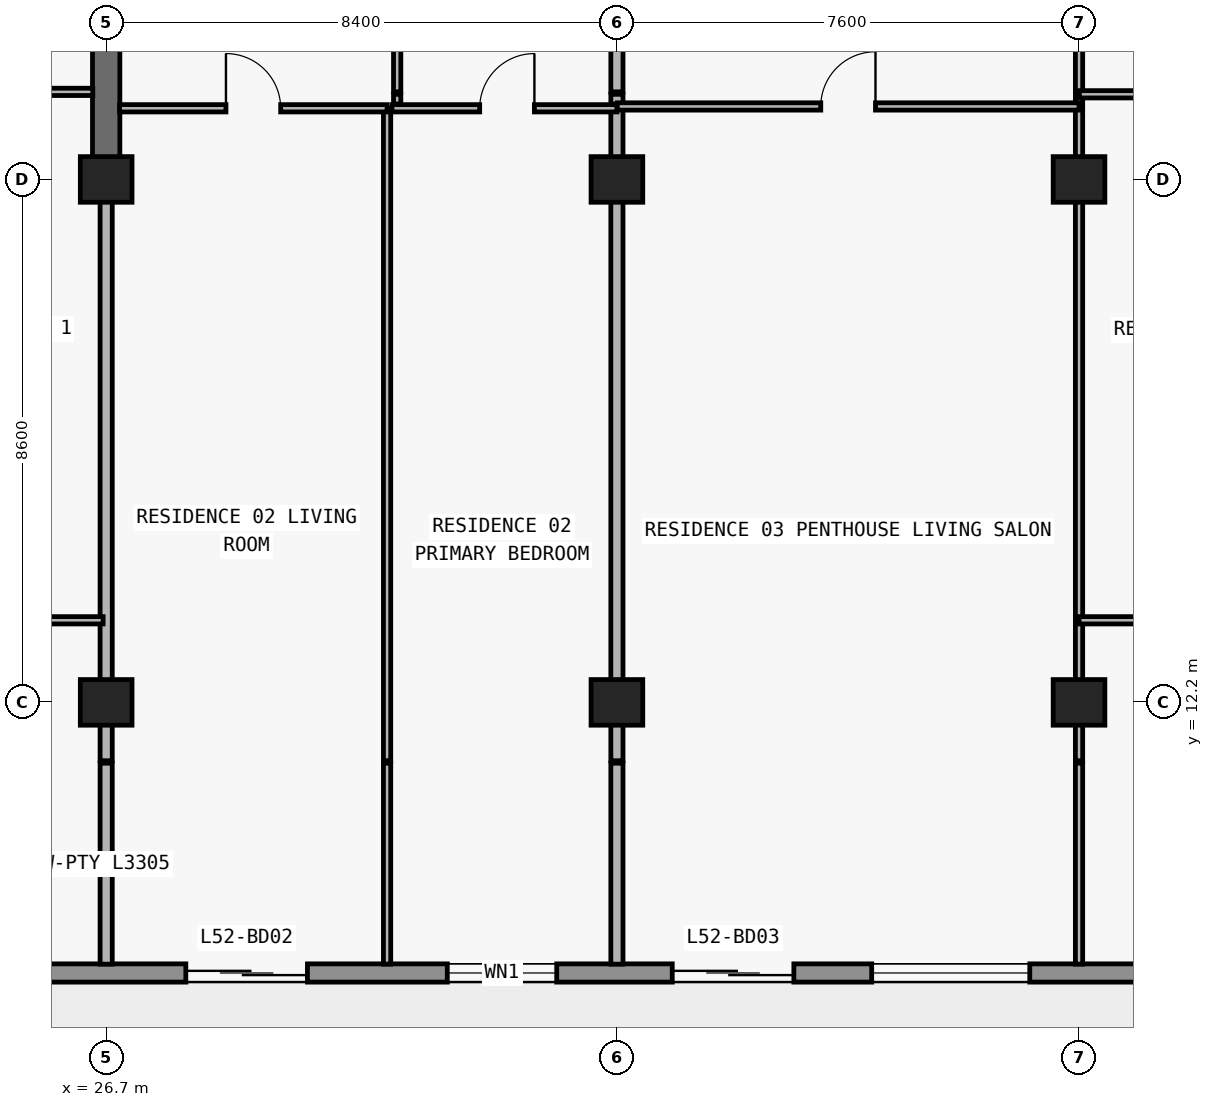
"""IFC4 building model, lengths in metres.
Left out: names, types, materials, properties, quantities, classifications, styles, units other than length and angle.
Written with IfcOpenShell. Run it as: python <this file> out.ifc"""

import sys

from ifc_helpers import new_model, si_unit, direction, frame, frame_2d, origin, origin_2d, place, context, subcontext, project, spatial, rectangle, extrude, element, fill, save


model = new_model("IFC4")
c1 = context("Model", 3, precision=1e-05, world=origin(), true_north=direction((0.0, 1.0)))
c2 = subcontext(c1, "Body", "Model", "MODEL_VIEW")
j1 = project(units=[si_unit("LENGTHUNIT", "METRE"), si_unit("PLANEANGLEUNIT", "RADIAN")], contexts=[c1])
p1 = place(None, origin())
s1 = spatial("IfcSite", under=j1, at=p1, CompositionType="ELEMENT")
p2 = place(p1, origin())
s2 = spatial("IfcBuilding", under=s1, at=p2, CompositionType="ELEMENT")
p3 = place(p2, frame((0.0, 0.0, 188.4)))
s3 = spatial("IfcBuildingStorey", under=s2, at=p3, CompositionType="ELEMENT", Elevation=188.4)
for number, where, z_axis, x_axis in (
    (1, (26.7, 12.2, 0.0), (0.0, 0.0, 1.0), (1.0, 0.0, 0.0)),
    (2, (35.1, 12.2, 0.0), (0.0, 0.0, 1.0), (1.0, 0.0, 0.0)),
    (3, (42.7, 12.2, 0.0), (0.0, 0.0, 1.0), (1.0, 0.0, 0.0)),
    (4, (26.7, 20.8, 0.0), (0.0, 0.0, 1.0), (1.0, 0.0, 0.0)),
    (5, (35.1, 20.8, 0.0), (0.0, 0.0, 1.0), (1.0, 0.0, 0.0)),
    (6, (42.7, 20.8, 0.0), (0.0, 0.0, 1.0), (1.0, 0.0, 0.0)),
):
    element("IfcColumn", number, at=place(p3, frame(where, z_axis=z_axis, x_axis=x_axis)), inside=s3, PredefinedType="COLUMN", context=c2, shape_type="SweptSolid", body=[
        extrude(rectangle(XDim=0.85, YDim=0.75, at=origin_2d()), origin(), (0.0, 0.0, 1.0), 3.05),
    ])
p4 = place(p3, frame((26.7, 20.8, 0.0), z_axis=(0.0, 0.0, 1.0), x_axis=(0.0, 1.0, 0.0)))
e7 = element("IfcWall", 7, at=p4, inside=s3, PredefinedType="SHEAR", context=c2, shape_type="SweptSolid", body=[
    extrude(rectangle(XDim=8.6, YDim=0.45, at=frame_2d((4.3, 0.0))), origin(), (0.0, 0.0, 1.0), 3.05),
])
p5 = place(p3, frame((67.7, 7.75, 0.0), z_axis=(0.0, 0.0, 1.0), x_axis=(-1.0, 0.0, 0.0)))
e8 = element("IfcWall", 8, at=p5, inside=s3, PredefinedType="STANDARD", context=c2, shape_type="SweptSolid", body=[
    extrude(rectangle(XDim=57.6, YDim=0.3, at=frame_2d((28.8, 0.0))), origin(), (0.0, 0.0, 1.0), 3.05),
])
p6 = place(p5, frame((54.69, 0.0, 0.0)))
e9 = element("IfcOpeningElement", 9, at=p6, cuts=e8, PredefinedType="OPENING", context=c2, shape_type="SweptSolid", body=[
    extrude(rectangle(XDim=2.0, YDim=2.3, at=frame_2d((1.0, 1.15))), frame((0.0, 0.16, 0.0), z_axis=(0.0, -1.0, 0.0), x_axis=(1.0, 0.0, 0.0)), (0.0, 0.0, 1.0), 0.32),
])
p7 = place(p5, frame((50.21, 0.0, 0.65)))
e10 = element("IfcOpeningElement", 10, at=p7, cuts=e8, PredefinedType="OPENING", context=c2, shape_type="SweptSolid", body=[
    extrude(rectangle(XDim=2.6, YDim=1.85, at=frame_2d((1.3, 0.925))), frame((0.0, 0.16, 0.0), z_axis=(0.0, -1.0, 0.0), x_axis=(1.0, 0.0, 0.0)), (0.0, 0.0, 1.0), 0.32),
])
p8 = place(p5, frame((44.1, 0.0, 0.85)))
e11 = element("IfcOpeningElement", 11, at=p8, cuts=e8, PredefinedType="OPENING", context=c2, shape_type="SweptSolid", body=[
    extrude(rectangle(XDim=2.2, YDim=1.55, at=frame_2d((1.1, 0.775))), frame((0.0, 0.16, 0.0), z_axis=(0.0, -1.0, 0.0), x_axis=(1.0, 0.0, 0.0)), (0.0, 0.0, 1.0), 0.32),
])
p9 = place(p5, frame((37.69, 0.0, 0.0)))
e12 = element("IfcOpeningElement", 12, at=p9, cuts=e8, PredefinedType="OPENING", context=c2, shape_type="SweptSolid", body=[
    extrude(rectangle(XDim=2.0, YDim=2.3, at=frame_2d((1.0, 1.15))), frame((0.0, 0.16, 0.0), z_axis=(0.0, -1.0, 0.0), x_axis=(1.0, 0.0, 0.0)), (0.0, 0.0, 1.0), 0.32),
])
p10 = place(p5, frame((33.59, 0.0, 0.85)))
e13 = element("IfcOpeningElement", 13, at=p10, cuts=e8, PredefinedType="OPENING", context=c2, shape_type="SweptSolid", body=[
    extrude(rectangle(XDim=1.8, YDim=1.55, at=frame_2d((0.9, 0.775))), frame((0.0, 0.16, 0.0), z_axis=(0.0, -1.0, 0.0), x_axis=(1.0, 0.0, 0.0)), (0.0, 0.0, 1.0), 0.32),
])
p11 = place(p5, frame((29.69, 0.0, 0.0)))
e14 = element("IfcOpeningElement", 14, at=p11, cuts=e8, PredefinedType="OPENING", context=c2, shape_type="SweptSolid", body=[
    extrude(rectangle(XDim=2.0, YDim=2.3, at=frame_2d((1.0, 1.15))), frame((0.0, 0.16, 0.0), z_axis=(0.0, -1.0, 0.0), x_axis=(1.0, 0.0, 0.0)), (0.0, 0.0, 1.0), 0.32),
])
p12 = place(p5, frame((25.81, 0.0, 0.65)))
e15 = element("IfcOpeningElement", 15, at=p12, cuts=e8, PredefinedType="OPENING", context=c2, shape_type="SweptSolid", body=[
    extrude(rectangle(XDim=2.6, YDim=1.85, at=frame_2d((1.3, 0.925))), frame((0.0, 0.16, 0.0), z_axis=(0.0, -1.0, 0.0), x_axis=(1.0, 0.0, 0.0)), (0.0, 0.0, 1.0), 0.32),
])
p13 = place(p5, frame((19.7, 0.0, 0.85)))
e16 = element("IfcOpeningElement", 16, at=p13, cuts=e8, PredefinedType="OPENING", context=c2, shape_type="SweptSolid", body=[
    extrude(rectangle(XDim=2.2, YDim=1.55, at=frame_2d((1.1, 0.775))), frame((0.0, 0.16, 0.0), z_axis=(0.0, -1.0, 0.0), x_axis=(1.0, 0.0, 0.0)), (0.0, 0.0, 1.0), 0.32),
])
p14 = place(p5, frame((13.29, 0.0, 0.0)))
e17 = element("IfcOpeningElement", 17, at=p14, cuts=e8, PredefinedType="OPENING", context=c2, shape_type="SweptSolid", body=[
    extrude(rectangle(XDim=2.0, YDim=2.3, at=frame_2d((1.0, 1.15))), frame((0.0, 0.16, 0.0), z_axis=(0.0, -1.0, 0.0), x_axis=(1.0, 0.0, 0.0)), (0.0, 0.0, 1.0), 0.32),
])
p15 = place(p5, frame((9.19, 0.0, 0.85)))
e18 = element("IfcOpeningElement", 18, at=p15, cuts=e8, PredefinedType="OPENING", context=c2, shape_type="SweptSolid", body=[
    extrude(rectangle(XDim=1.8, YDim=1.55, at=frame_2d((0.9, 0.775))), frame((0.0, 0.16, 0.0), z_axis=(0.0, -1.0, 0.0), x_axis=(1.0, 0.0, 0.0)), (0.0, 0.0, 1.0), 0.32),
])
p16 = place(p5, frame((5.273, 0.0, 0.0)))
e19 = element("IfcOpeningElement", 19, at=p16, cuts=e8, PredefinedType="OPENING", context=c2, shape_type="SweptSolid", body=[
    extrude(rectangle(XDim=2.0, YDim=2.3, at=frame_2d((1.0, 1.15))), frame((0.0, 0.16, 0.0), z_axis=(0.0, -1.0, 0.0), x_axis=(1.0, 0.0, 0.0)), (0.0, 0.0, 1.0), 0.32),
])
p17 = place(p5, frame((1.073, 0.0, 0.85)))
e20 = element("IfcOpeningElement", 20, at=p17, cuts=e8, PredefinedType="OPENING", context=c2, shape_type="SweptSolid", body=[
    extrude(rectangle(XDim=2.2, YDim=1.55, at=frame_2d((1.1, 0.775))), frame((0.0, 0.16, 0.0), z_axis=(0.0, -1.0, 0.0), x_axis=(1.0, 0.0, 0.0)), (0.0, 0.0, 1.0), 0.32),
])
p18 = place(p3, frame((26.7, 7.895, 0.0), z_axis=(0.0, 0.0, 1.0), x_axis=(0.0, 1.0, 0.0)))
e21 = element("IfcWall", 21, at=p18, inside=s3, PredefinedType="PARTITIONING", context=c2, shape_type="SweptSolid", body=[
    extrude(rectangle(XDim=3.305, YDim=0.2, at=frame_2d((1.652, 0.0))), origin(), (0.0, 0.0, 1.0), 3.05),
])
p19 = place(p3, frame((26.7, 11.24, 0.0), z_axis=(0.0, 0.0, 1.0), x_axis=(0.0, 1.0, 0.0)))
e22 = element("IfcWall", 22, at=p19, inside=s3, PredefinedType="PARTITIONING", context=c2, shape_type="SweptSolid", body=[
    extrude(rectangle(XDim=9.555, YDim=0.2, at=frame_2d((4.777, 0.0))), origin(), (0.0, 0.0, 1.0), 2.263),
])
p20 = place(p3, frame((31.32, 7.895, 0.0), z_axis=(0.0, 0.0, 1.0), x_axis=(0.0, 1.0, 0.0)))
e23 = element("IfcWall", 23, at=p20, inside=s3, PredefinedType="PARTITIONING", context=c2, shape_type="SweptSolid", body=[
    extrude(rectangle(XDim=3.305, YDim=0.12, at=frame_2d((1.652, 0.0))), origin(), (0.0, 0.0, 1.0), 3.05),
])
p21 = place(p3, frame((31.32, 11.24, 0.0), z_axis=(0.0, 0.0, 1.0), x_axis=(0.0, 1.0, 0.0)))
e24 = element("IfcWall", 24, at=p21, inside=s3, PredefinedType="PARTITIONING", context=c2, shape_type="SweptSolid", body=[
    extrude(rectangle(XDim=10.73, YDim=0.12, at=frame_2d((5.365, 0.0))), origin(), (0.0, 0.0, 1.0), 3.05),
])
p22 = place(p3, frame((31.486, 22.04, 0.0), z_axis=(0.0, 0.0, 1.0), x_axis=(0.0, 1.0, 0.0)))
e25 = element("IfcWall", 25, at=p22, inside=s3, PredefinedType="PARTITIONING", context=c2, shape_type="SweptSolid", body=[
    extrude(rectangle(XDim=0.16, YDim=0.12, at=frame_2d((0.08, 0.0))), origin(), (0.0, 0.0, 1.0), 3.05),
])
p23 = place(p3, frame((31.486, 22.24, 0.0), z_axis=(0.0, 0.0, 1.0), x_axis=(0.0, 1.0, 0.0)))
e26 = element("IfcWall", 26, at=p23, inside=s3, PredefinedType="PARTITIONING", context=c2, shape_type="SweptSolid", body=[
    extrude(rectangle(XDim=4.36, YDim=0.12, at=frame_2d((2.18, 0.0))), origin(), (0.0, 0.0, 1.0), 3.05),
])
p24 = place(p23, frame((1.73, 0.0, 0.0)))
e27 = element("IfcOpeningElement", 27, at=p24, cuts=e26, PredefinedType="OPENING", context=c2, shape_type="SweptSolid", body=[
    extrude(rectangle(XDim=0.9, YDim=2.15, at=frame_2d((0.45, 1.075))), frame((0.0, 0.07, 0.0), z_axis=(0.0, -1.0, 0.0), x_axis=(1.0, 0.0, 0.0)), (0.0, 0.0, 1.0), 0.14),
])
p25 = place(p3, frame((35.1, 7.895, 0.0), z_axis=(0.0, 0.0, 1.0), x_axis=(0.0, 1.0, 0.0)))
e28 = element("IfcWall", 28, at=p25, inside=s3, PredefinedType="PARTITIONING", context=c2, shape_type="SweptSolid", body=[
    extrude(rectangle(XDim=3.305, YDim=0.2, at=frame_2d((1.652, 0.0))), origin(), (0.0, 0.0, 1.0), 3.05),
])
p26 = place(p3, frame((35.1, 11.24, 0.0), z_axis=(0.0, 0.0, 1.0), x_axis=(0.0, 1.0, 0.0)))
e29 = element("IfcWall", 29, at=p26, inside=s3, PredefinedType="PARTITIONING", context=c2, shape_type="SweptSolid", body=[
    extrude(rectangle(XDim=10.73, YDim=0.2, at=frame_2d((5.365, 0.0))), origin(), (0.0, 0.0, 1.0), 2.263),
])
p27 = place(p3, frame((35.1, 22.04, 0.0), z_axis=(0.0, 0.0, 1.0), x_axis=(0.0, 1.0, 0.0)))
e30 = element("IfcWall", 30, at=p27, inside=s3, PredefinedType="PARTITIONING", context=c2, shape_type="SweptSolid", body=[
    extrude(rectangle(XDim=0.16, YDim=0.2, at=frame_2d((0.08, 0.0))), origin(), (0.0, 0.0, 1.0), 2.263),
])
p28 = place(p3, frame((35.1, 22.24, 0.0), z_axis=(0.0, 0.0, 1.0), x_axis=(0.0, 1.0, 0.0)))
e31 = element("IfcWall", 31, at=p28, inside=s3, PredefinedType="PARTITIONING", context=c2, shape_type="SweptSolid", body=[
    extrude(rectangle(XDim=4.36, YDim=0.2, at=frame_2d((2.18, 0.0))), origin(), (0.0, 0.0, 1.0), 2.263),
])
p29 = place(p3, frame((42.7, 7.895, 0.0), z_axis=(0.0, 0.0, 1.0), x_axis=(0.0, 1.0, 0.0)))
e32 = element("IfcWall", 32, at=p29, inside=s3, PredefinedType="PARTITIONING", context=c2, shape_type="SweptSolid", body=[
    extrude(rectangle(XDim=3.305, YDim=0.12, at=frame_2d((1.652, 0.0))), origin(), (0.0, 0.0, 1.0), 3.05),
])
p30 = place(p3, frame((42.7, 11.24, 0.0), z_axis=(0.0, 0.0, 1.0), x_axis=(0.0, 1.0, 0.0)))
e33 = element("IfcWall", 33, at=p30, inside=s3, PredefinedType="PARTITIONING", context=c2, shape_type="SweptSolid", body=[
    extrude(rectangle(XDim=10.73, YDim=0.12, at=frame_2d((5.365, 0.0))), origin(), (0.0, 0.0, 1.0), 2.263),
])
p31 = place(p3, frame((42.7, 22.04, 0.0), z_axis=(0.0, 0.0, 1.0), x_axis=(0.0, 1.0, 0.0)))
e34 = element("IfcWall", 34, at=p31, inside=s3, PredefinedType="PARTITIONING", context=c2, shape_type="SweptSolid", body=[
    extrude(rectangle(XDim=0.16, YDim=0.12, at=frame_2d((0.08, 0.0))), origin(), (0.0, 0.0, 1.0), 2.263),
])
p32 = place(p3, frame((42.7, 22.24, 0.0), z_axis=(0.0, 0.0, 1.0), x_axis=(0.0, 1.0, 0.0)))
e35 = element("IfcWall", 35, at=p32, inside=s3, PredefinedType="PARTITIONING", context=c2, shape_type="SweptSolid", body=[
    extrude(rectangle(XDim=4.36, YDim=0.12, at=frame_2d((2.18, 0.0))), origin(), (0.0, 0.0, 1.0), 2.263),
])
p33 = place(p32, frame((1.73, 0.0, 0.0)))
e36 = element("IfcOpeningElement", 36, at=p33, cuts=e35, PredefinedType="OPENING", context=c2, shape_type="SweptSolid", body=[
    extrude(rectangle(XDim=0.9, YDim=2.15, at=frame_2d((0.45, 1.075))), frame((0.0, 0.07, 0.0), z_axis=(0.0, -1.0, 0.0), x_axis=(1.0, 0.0, 0.0)), (0.0, 0.0, 1.0), 0.14),
])
p34 = place(p3, frame((18.3, 13.55, 0.0), z_axis=(0.0, 0.0, 1.0), x_axis=(1.0, 0.0, 0.0)))
e37 = element("IfcWall", 37, at=p34, inside=s3, PredefinedType="PARTITIONING", context=c2, shape_type="SweptSolid", body=[
    extrude(rectangle(XDim=8.35, YDim=0.12, at=frame_2d((4.175, 0.0))), origin(), (0.0, 0.0, 1.0), 3.05),
])
p35 = place(p34, frame((3.725, 0.0, 0.0)))
e38 = element("IfcOpeningElement", 38, at=p35, cuts=e37, PredefinedType="OPENING", context=c2, shape_type="SweptSolid", body=[
    extrude(rectangle(XDim=0.9, YDim=2.15, at=frame_2d((0.45, 1.075))), frame((0.0, 0.07, 0.0), z_axis=(0.0, -1.0, 0.0), x_axis=(1.0, 0.0, 0.0)), (0.0, 0.0, 1.0), 0.14),
])
p36 = place(p3, frame((42.7, 13.55, 0.0), z_axis=(0.0, 0.0, 1.0), x_axis=(1.0, 0.0, 0.0)))
e39 = element("IfcWall", 39, at=p36, inside=s3, PredefinedType="PARTITIONING", context=c2, shape_type="SweptSolid", body=[
    extrude(rectangle(XDim=8.4, YDim=0.12, at=frame_2d((4.2, 0.0))), origin(), (0.0, 0.0, 1.0), 3.05),
])
p37 = place(p36, frame((3.75, 0.0, 0.0)))
e40 = element("IfcOpeningElement", 40, at=p37, cuts=e39, PredefinedType="OPENING", context=c2, shape_type="SweptSolid", body=[
    extrude(rectangle(XDim=0.9, YDim=2.15, at=frame_2d((0.45, 1.075))), frame((0.0, 0.07, 0.0), z_axis=(0.0, -1.0, 0.0), x_axis=(1.0, 0.0, 0.0)), (0.0, 0.0, 1.0), 0.14),
])
p38 = place(p3, frame((26.92, 21.97, 0.0), z_axis=(0.0, 0.0, 1.0), x_axis=(1.0, 0.0, 0.0)))
e41 = element("IfcWall", 41, at=p38, inside=s3, PredefinedType="PARTITIONING", context=c2, shape_type="SweptSolid", body=[
    extrude(rectangle(XDim=4.4, YDim=0.12, at=frame_2d((2.2, 0.0))), origin(), (0.0, 0.0, 1.0), 3.05),
])
p39 = place(p38, frame((1.75, 0.0, 0.0)))
e42 = element("IfcOpeningElement", 42, at=p39, cuts=e41, PredefinedType="OPENING", context=c2, shape_type="SweptSolid", body=[
    extrude(rectangle(XDim=0.9, YDim=2.15, at=frame_2d((0.45, 1.075))), frame((0.0, 0.07, 0.0), z_axis=(0.0, -1.0, 0.0), x_axis=(1.0, 0.0, 0.0)), (0.0, 0.0, 1.0), 0.14),
])
p40 = place(p3, frame((31.4, 21.97, 0.0), z_axis=(0.0, 0.0, 1.0), x_axis=(1.0, 0.0, 0.0)))
e43 = element("IfcWall", 43, at=p40, inside=s3, PredefinedType="PARTITIONING", context=c2, shape_type="SweptSolid", body=[
    extrude(rectangle(XDim=3.7, YDim=0.12, at=frame_2d((1.85, 0.0))), origin(), (0.0, 0.0, 1.0), 3.05),
])
p41 = place(p40, frame((1.443, 0.0, 0.0)))
e44 = element("IfcOpeningElement", 44, at=p41, cuts=e43, PredefinedType="OPENING", context=c2, shape_type="SweptSolid", body=[
    extrude(rectangle(XDim=0.9, YDim=2.15, at=frame_2d((0.45, 1.075))), frame((0.0, 0.07, 0.0), z_axis=(0.0, -1.0, 0.0), x_axis=(1.0, 0.0, 0.0)), (0.0, 0.0, 1.0), 0.14),
])
p42 = place(p3, frame((35.105, 22.0, 0.0), z_axis=(0.0, 0.0, 1.0), x_axis=(1.0, 0.0, 0.0)))
e45 = element("IfcWall", 45, at=p42, inside=s3, PredefinedType="PARTITIONING", context=c2, shape_type="SweptSolid", body=[
    extrude(rectangle(XDim=7.595, YDim=0.12, at=frame_2d((3.797, 0.0))), origin(), (0.0, 0.0, 1.0), 3.05),
])
p43 = place(p42, frame((3.347, 0.0, 0.0)))
e46 = element("IfcOpeningElement", 46, at=p43, cuts=e45, PredefinedType="OPENING", context=c2, shape_type="SweptSolid", body=[
    extrude(rectangle(XDim=0.9, YDim=2.15, at=frame_2d((0.45, 1.075))), frame((0.0, 0.07, 0.0), z_axis=(0.0, -1.0, 0.0), x_axis=(1.0, 0.0, 0.0)), (0.0, 0.0, 1.0), 0.14),
])
p44 = place(p3, frame((42.705, 22.2, 0.0), z_axis=(0.0, 0.0, 1.0), x_axis=(1.0, 0.0, 0.0)))
e47 = element("IfcWall", 47, at=p44, inside=s3, PredefinedType="PARTITIONING", context=c2, shape_type="SweptSolid", body=[
    extrude(rectangle(XDim=8.175, YDim=0.12, at=frame_2d((4.087, 0.0))), origin(), (0.0, 0.0, 1.0), 3.05),
])
p45 = place(p44, frame((3.637, 0.0, 0.0)))
e48 = element("IfcOpeningElement", 48, at=p45, cuts=e47, PredefinedType="OPENING", context=c2, shape_type="SweptSolid", body=[
    extrude(rectangle(XDim=0.9, YDim=2.15, at=frame_2d((0.45, 1.075))), frame((0.0, 0.07, 0.0), z_axis=(0.0, -1.0, 0.0), x_axis=(1.0, 0.0, 0.0)), (0.0, 0.0, 1.0), 0.14),
])
p46 = place(p3, frame((18.305, 22.24, 0.0), z_axis=(0.0, 0.0, 1.0), x_axis=(1.0, 0.0, 0.0)))
e49 = element("IfcWall", 49, at=p46, inside=s3, PredefinedType="PARTITIONING", context=c2, shape_type="SweptSolid", body=[
    extrude(rectangle(XDim=8.175, YDim=0.12, at=frame_2d((4.087, 0.0))), origin(), (0.0, 0.0, 1.0), 3.05),
])
p47 = place(p46, frame((3.637, 0.0, 0.0)))
e50 = element("IfcOpeningElement", 50, at=p47, cuts=e49, PredefinedType="OPENING", context=c2, shape_type="SweptSolid", body=[
    extrude(rectangle(XDim=0.9, YDim=2.15, at=frame_2d((0.45, 1.075))), frame((0.0, 0.07, 0.0), z_axis=(0.0, -1.0, 0.0), x_axis=(1.0, 0.0, 0.0)), (0.0, 0.0, 1.0), 0.14),
])
p48 = place(p9, origin())
e51 = element("IfcDoor", 51, at=p48, inside=s3, OperationType="DOUBLE_DOOR_SLIDING", PredefinedType="DOOR", context=c2, shape_type="SweptSolid", body=[
    extrude(rectangle(XDim=2.0, YDim=2.3, at=frame_2d((1.0, 1.15))), frame((0.0, 0.025, 0.0), z_axis=(0.0, -1.0, 0.0), x_axis=(1.0, 0.0, 0.0)), (0.0, 0.0, 1.0), 0.05),
])
fill(e12, e51)
p49 = place(p10, origin())
e52 = element("IfcWindow", 52, at=p49, inside=s3, PartitioningType="SINGLE_PANEL", PredefinedType="WINDOW", context=c2, shape_type="SweptSolid", body=[
    extrude(rectangle(XDim=1.8, YDim=1.55, at=frame_2d((0.9, 0.775))), frame((0.0, 0.03, 0.0), z_axis=(0.0, -1.0, 0.0), x_axis=(1.0, 0.0, 0.0)), (0.0, 0.0, 1.0), 0.06),
])
fill(e13, e52)
p50 = place(p11, origin())
e53 = element("IfcDoor", 53, at=p50, inside=s3, OperationType="DOUBLE_DOOR_SLIDING", PredefinedType="DOOR", context=c2, shape_type="SweptSolid", body=[
    extrude(rectangle(XDim=2.0, YDim=2.3, at=frame_2d((1.0, 1.15))), frame((0.0, 0.025, 0.0), z_axis=(0.0, -1.0, 0.0), x_axis=(1.0, 0.0, 0.0)), (0.0, 0.0, 1.0), 0.05),
])
fill(e14, e53)
p51 = place(p12, origin())
e54 = element("IfcWindow", 54, at=p51, inside=s3, PartitioningType="SINGLE_PANEL", PredefinedType="WINDOW", context=c2, shape_type="SweptSolid", body=[
    extrude(rectangle(XDim=2.6, YDim=1.85, at=frame_2d((1.3, 0.925))), frame((0.0, 0.03, 0.0), z_axis=(0.0, -1.0, 0.0), x_axis=(1.0, 0.0, 0.0)), (0.0, 0.0, 1.0), 0.06),
])
fill(e15, e54)
p52 = place(p39, origin())
e55 = element("IfcDoor", 55, at=p52, inside=s3, OperationType="SINGLE_SWING_LEFT", PredefinedType="DOOR", context=c2, shape_type="SweptSolid", body=[
    extrude(rectangle(XDim=0.9, YDim=2.15, at=frame_2d((0.45, 1.075))), frame((0.0, 0.025, 0.0), z_axis=(0.0, -1.0, 0.0), x_axis=(1.0, 0.0, 0.0)), (0.0, 0.0, 1.0), 0.05),
])
fill(e42, e55)
p53 = place(p41, origin())
e56 = element("IfcDoor", 56, at=p53, inside=s3, OperationType="SINGLE_SWING_RIGHT", PredefinedType="DOOR", context=c2, shape_type="SweptSolid", body=[
    extrude(rectangle(XDim=0.9, YDim=2.15, at=frame_2d((0.45, 1.075))), frame((0.0, 0.025, 0.0), z_axis=(0.0, -1.0, 0.0), x_axis=(1.0, 0.0, 0.0)), (0.0, 0.0, 1.0), 0.05),
])
fill(e44, e56)
p54 = place(p43, origin())
e57 = element("IfcDoor", 57, at=p54, inside=s3, OperationType="SINGLE_SWING_RIGHT", PredefinedType="DOOR", context=c2, shape_type="SweptSolid", body=[
    extrude(rectangle(XDim=0.9, YDim=2.15, at=frame_2d((0.45, 1.075))), frame((0.0, 0.025, 0.0), z_axis=(0.0, -1.0, 0.0), x_axis=(1.0, 0.0, 0.0)), (0.0, 0.0, 1.0), 0.05),
])
fill(e46, e57)
save(model, sys.argv[1])
